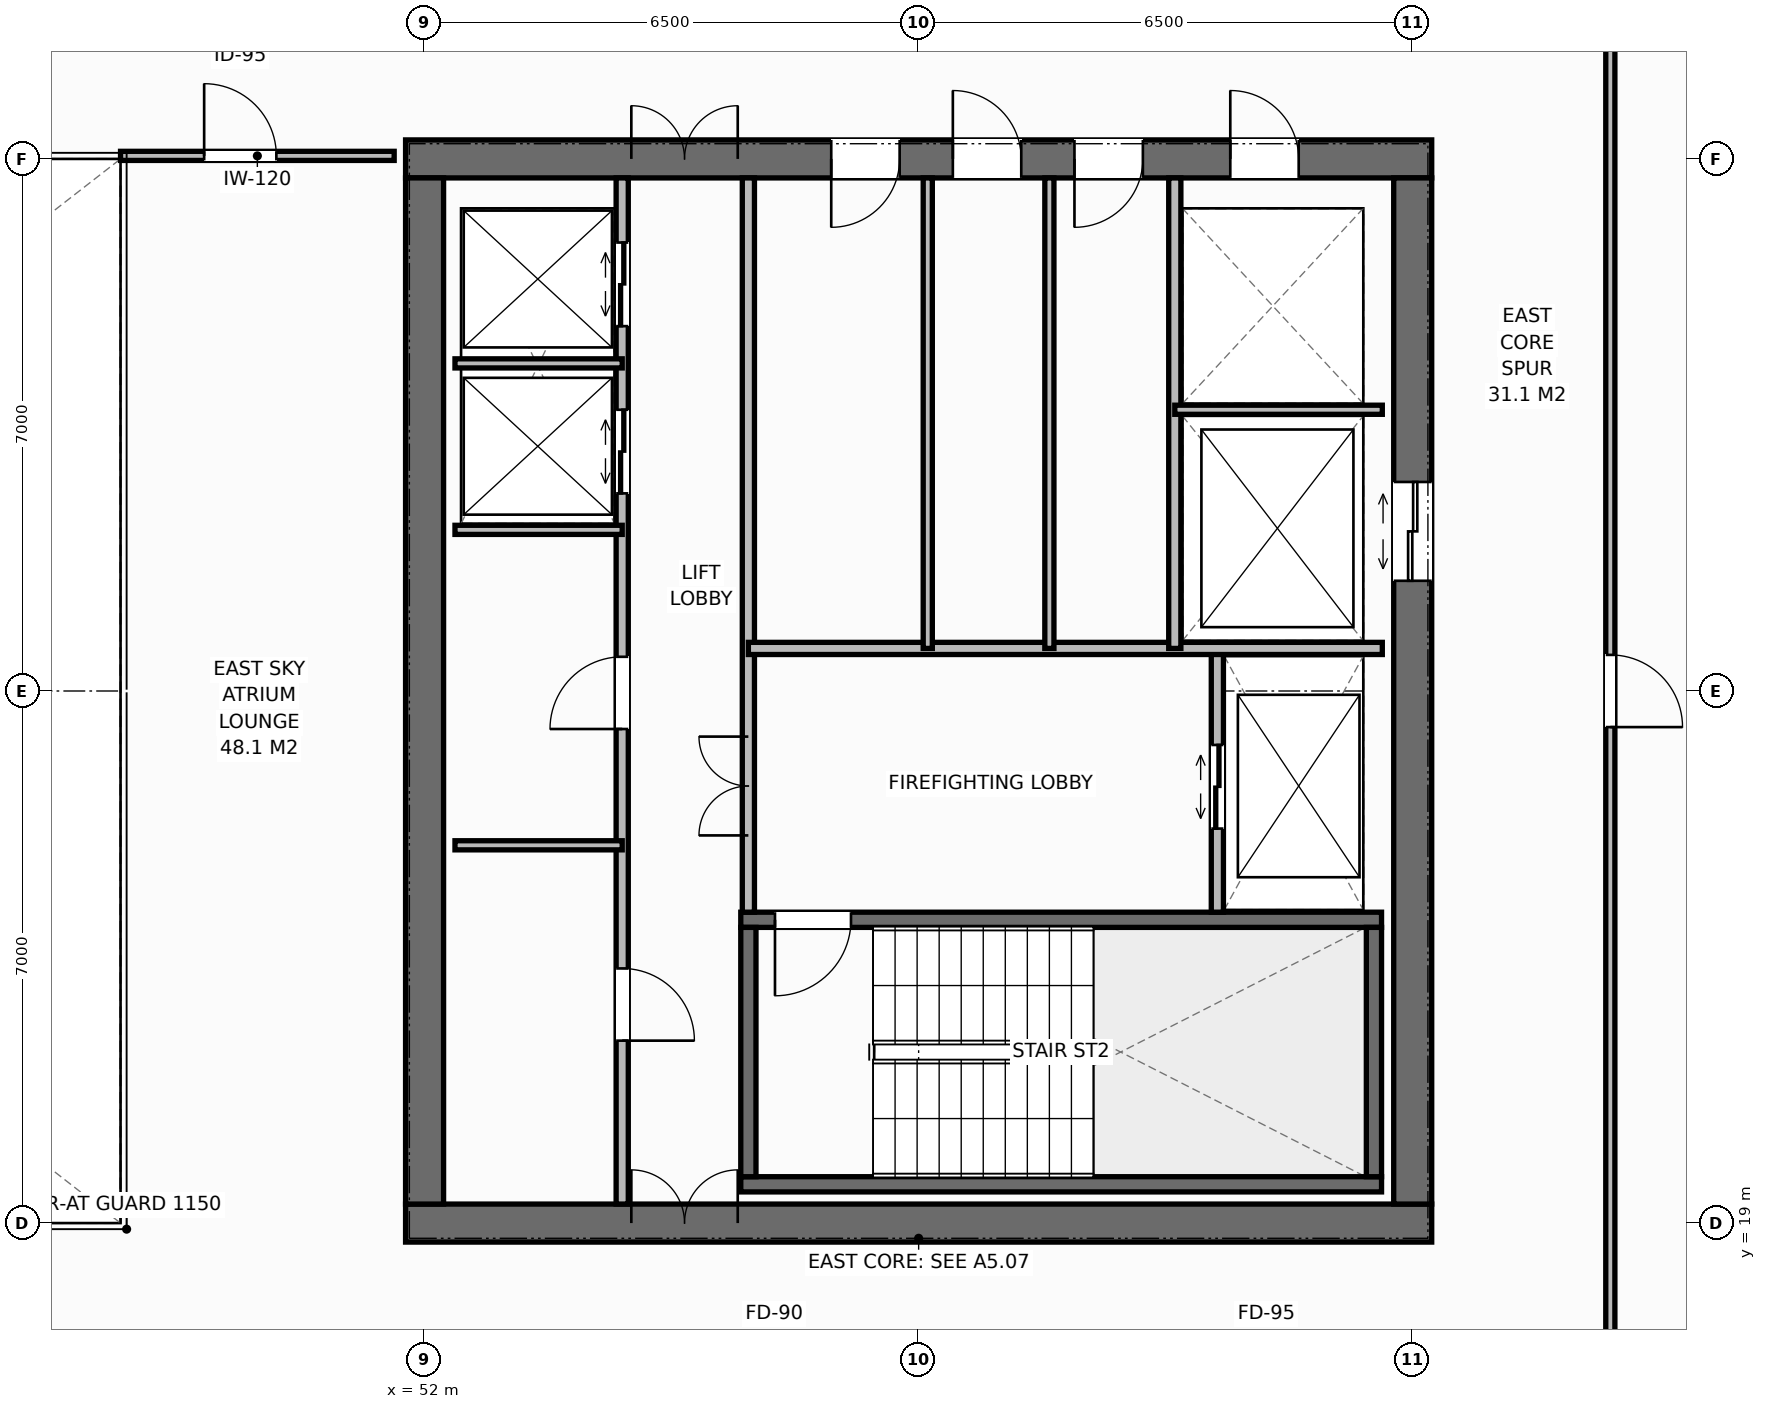
"""IFC4 building model, lengths in metres.
Left out: names, types, materials, properties, quantities, classifications, styles, units other than length and angle.
Written with IfcOpenShell. Run it as: python <this file> out.ifc"""

import sys

from ifc_helpers import new_model, si_unit, direction, frame, frame_2d, origin, place, context, subcontext, project, spatial, rectangle, extrude, element, fill, save


model = new_model("IFC4")
c1 = context("Model", 3, precision=1e-05, world=origin(), true_north=direction((0.0, 1.0)))
c2 = subcontext(c1, "Body", "Model", "MODEL_VIEW")
j1 = project(units=[si_unit("LENGTHUNIT", "METRE"), si_unit("PLANEANGLEUNIT", "RADIAN")], contexts=[c1])
p1 = place(None, origin())
s1 = spatial("IfcSite", under=j1, at=p1, CompositionType="ELEMENT")
p2 = place(p1, origin())
s2 = spatial("IfcBuilding", under=s1, at=p2, CompositionType="ELEMENT")
p3 = place(p2, frame((0.0, 0.0, 213.8)))
s3 = spatial("IfcBuildingStorey", under=s2, at=p3, CompositionType="ELEMENT", Elevation=213.8)
p4 = place(p3, frame((51.75, 19.0, 0.0), z_axis=(0.0, 0.0, 1.0), x_axis=(1.0, 0.0, 0.0)))
e1 = element("IfcWall", 1, at=p4, inside=s3, PredefinedType="SHEAR", context=c2, shape_type="SweptSolid", body=[
    extrude(rectangle(XDim=13.5, YDim=0.5, at=frame_2d((6.75, 0.0))), origin(), (0.0, 0.0, 1.0), 3.8),
])
p5 = place(p4, frame((2.97, 0.0, 0.0)))
e2 = element("IfcOpeningElement", 2, at=p5, cuts=e1, PredefinedType="OPENING", context=c2, shape_type="SweptSolid", body=[
    extrude(rectangle(XDim=1.4, YDim=2.2, at=frame_2d((0.7, 1.1))), frame((0.0, 0.26, 0.0), z_axis=(0.0, -1.0, 0.0), x_axis=(1.0, 0.0, 0.0)), (0.0, 0.0, 1.0), 0.52),
])
p6 = place(p3, frame((51.75, 33.0, 0.0), z_axis=(0.0, 0.0, 1.0), x_axis=(1.0, 0.0, 0.0)))
e3 = element("IfcWall", 3, at=p6, inside=s3, PredefinedType="SHEAR", context=c2, shape_type="SweptSolid", body=[
    extrude(rectangle(XDim=13.5, YDim=0.5, at=frame_2d((6.75, 0.0))), origin(), (0.0, 0.0, 1.0), 3.8),
])
p7 = place(p6, frame((2.97, 0.0, 0.0)))
e4 = element("IfcOpeningElement", 4, at=p7, cuts=e3, PredefinedType="OPENING", context=c2, shape_type="SweptSolid", body=[
    extrude(rectangle(XDim=1.4, YDim=2.2, at=frame_2d((0.7, 1.1))), frame((0.0, 0.26, 0.0), z_axis=(0.0, -1.0, 0.0), x_axis=(1.0, 0.0, 0.0)), (0.0, 0.0, 1.0), 0.52),
])
p8 = place(p6, frame((10.85, 0.0, 0.0)))
e5 = element("IfcOpeningElement", 5, at=p8, cuts=e3, PredefinedType="OPENING", context=c2, shape_type="SweptSolid", body=[
    extrude(rectangle(XDim=0.9, YDim=2.15, at=frame_2d((0.45, 1.075))), frame((0.0, 0.26, 0.0), z_axis=(0.0, -1.0, 0.0), x_axis=(1.0, 0.0, 0.0)), (0.0, 0.0, 1.0), 0.52),
])
p9 = place(p6, frame((5.6, 0.0, 0.0)))
e6 = element("IfcOpeningElement", 6, at=p9, cuts=e3, PredefinedType="OPENING", context=c2, shape_type="SweptSolid", body=[
    extrude(rectangle(XDim=0.9, YDim=2.15, at=frame_2d((0.45, 1.075))), frame((0.0, 0.26, 0.0), z_axis=(0.0, -1.0, 0.0), x_axis=(1.0, 0.0, 0.0)), (0.0, 0.0, 1.0), 0.52),
])
p10 = place(p6, frame((7.2, 0.0, 0.0)))
e7 = element("IfcOpeningElement", 7, at=p10, cuts=e3, PredefinedType="OPENING", context=c2, shape_type="SweptSolid", body=[
    extrude(rectangle(XDim=0.9, YDim=2.15, at=frame_2d((0.45, 1.075))), frame((0.0, 0.26, 0.0), z_axis=(0.0, -1.0, 0.0), x_axis=(1.0, 0.0, 0.0)), (0.0, 0.0, 1.0), 0.52),
])
p11 = place(p6, frame((8.8, 0.0, 0.0)))
e8 = element("IfcOpeningElement", 8, at=p11, cuts=e3, PredefinedType="OPENING", context=c2, shape_type="SweptSolid", body=[
    extrude(rectangle(XDim=0.9, YDim=2.15, at=frame_2d((0.45, 1.075))), frame((0.0, 0.26, 0.0), z_axis=(0.0, -1.0, 0.0), x_axis=(1.0, 0.0, 0.0)), (0.0, 0.0, 1.0), 0.52),
])
p12 = place(p3, frame((52.0, 19.25, 0.0), z_axis=(0.0, 0.0, 1.0), x_axis=(0.0, 1.0, 0.0)))
e9 = element("IfcWall", 9, at=p12, inside=s3, PredefinedType="SHEAR", context=c2, shape_type="SweptSolid", body=[
    extrude(rectangle(XDim=13.5, YDim=0.5, at=frame_2d((6.75, 0.0))), origin(), (0.0, 0.0, 1.0), 3.8),
])
p13 = place(p3, frame((65.0, 19.25, 0.0), z_axis=(0.0, 0.0, 1.0), x_axis=(0.0, 1.0, 0.0)))
e10 = element("IfcWall", 10, at=p13, inside=s3, PredefinedType="SHEAR", context=c2, shape_type="SweptSolid", body=[
    extrude(rectangle(XDim=13.5, YDim=0.5, at=frame_2d((6.75, 0.0))), origin(), (0.0, 0.0, 1.0), 3.8),
])
p14 = place(p13, frame((8.2, 0.0, 0.0)))
e11 = element("IfcOpeningElement", 11, at=p14, cuts=e10, PredefinedType="OPENING", context=c2, shape_type="SweptSolid", body=[
    extrude(rectangle(XDim=1.3, YDim=2.2, at=frame_2d((0.65, 1.1))), frame((0.0, 0.26, 0.0), z_axis=(0.0, -1.0, 0.0), x_axis=(1.0, 0.0, 0.0)), (0.0, 0.0, 1.0), 0.52),
])
p15 = place(p3, frame((56.16, 19.51, 0.0), z_axis=(0.0, 0.0, 1.0), x_axis=(1.0, 0.0, 0.0)))
e12 = element("IfcWall", 12, at=p15, inside=s3, PredefinedType="SHEAR", context=c2, shape_type="SweptSolid", body=[
    extrude(rectangle(XDim=8.43, YDim=0.2, at=frame_2d((4.215, 0.0))), origin(), (0.0, 0.0, 1.0), 3.8),
])
p16 = place(p3, frame((56.16, 22.99, 0.0), z_axis=(0.0, 0.0, 1.0), x_axis=(1.0, 0.0, 0.0)))
e13 = element("IfcWall", 13, at=p16, inside=s3, PredefinedType="SHEAR", context=c2, shape_type="SweptSolid", body=[
    extrude(rectangle(XDim=8.43, YDim=0.2, at=frame_2d((4.215, 0.0))), origin(), (0.0, 0.0, 1.0), 3.8),
])
p17 = place(p16, frame((0.45, 0.0, 0.0)))
e14 = element("IfcOpeningElement", 14, at=p17, cuts=e13, PredefinedType="OPENING", context=c2, shape_type="SweptSolid", body=[
    extrude(rectangle(XDim=1.0, YDim=2.15, at=frame_2d((0.5, 1.075))), frame((0.0, 0.11, 0.0), z_axis=(0.0, -1.0, 0.0), x_axis=(1.0, 0.0, 0.0)), (0.0, 0.0, 1.0), 0.22),
])
for number, where, z_axis, x_axis in (
    (15, (56.26, 19.61, 0.0), (0.0, 0.0, 1.0), (0.0, 1.0, 0.0)),
    (16, (64.49, 19.61, 0.0), (0.0, 0.0, 1.0), (0.0, 1.0, 0.0)),
):
    element("IfcWall", number, at=place(p3, frame(where, z_axis=z_axis, x_axis=x_axis)), inside=s3, PredefinedType="SHEAR", context=c2, shape_type="SweptSolid", body=[
        extrude(rectangle(XDim=3.28, YDim=0.2, at=frame_2d((1.64, 0.0))), origin(), (0.0, 0.0, 1.0), 3.8),
    ])
p18 = place(p3, frame((54.6, 19.25, 0.0), z_axis=(0.0, 0.0, 1.0), x_axis=(0.0, 1.0, 0.0)))
e17 = element("IfcWall", 17, at=p18, inside=s3, PredefinedType="STANDARD", context=c2, shape_type="SweptSolid", body=[
    extrude(rectangle(XDim=13.5, YDim=0.16, at=frame_2d((6.75, 0.0))), origin(), (0.0, 0.0, 1.0), 3.58),
])
p19 = place(p18, frame((2.15, 0.0, 0.0)))
e18 = element("IfcOpeningElement", 18, at=p19, cuts=e17, PredefinedType="OPENING", context=c2, shape_type="SweptSolid", body=[
    extrude(rectangle(XDim=0.95, YDim=2.15, at=frame_2d((0.475, 1.075))), frame((0.0, 0.09, 0.0), z_axis=(0.0, -1.0, 0.0), x_axis=(1.0, 0.0, 0.0)), (0.0, 0.0, 1.0), 0.18),
])
p20 = place(p18, frame((6.25, 0.0, 0.0)))
e19 = element("IfcOpeningElement", 19, at=p20, cuts=e17, PredefinedType="OPENING", context=c2, shape_type="SweptSolid", body=[
    extrude(rectangle(XDim=0.95, YDim=2.15, at=frame_2d((0.475, 1.075))), frame((0.0, 0.09, 0.0), z_axis=(0.0, -1.0, 0.0), x_axis=(1.0, 0.0, 0.0)), (0.0, 0.0, 1.0), 0.18),
])
p21 = place(p18, frame((9.35, 0.0, 0.0)))
e20 = element("IfcOpeningElement", 20, at=p21, cuts=e17, PredefinedType="OPENING", context=c2, shape_type="SweptSolid", body=[
    extrude(rectangle(XDim=1.1, YDim=2.2, at=frame_2d((0.55, 1.1))), frame((0.0, 0.09, 0.0), z_axis=(0.0, -1.0, 0.0), x_axis=(1.0, 0.0, 0.0)), (0.0, 0.0, 1.0), 0.18),
])
p22 = place(p18, frame((11.55, 0.0, 0.0)))
e21 = element("IfcOpeningElement", 21, at=p22, cuts=e17, PredefinedType="OPENING", context=c2, shape_type="SweptSolid", body=[
    extrude(rectangle(XDim=1.1, YDim=2.2, at=frame_2d((0.55, 1.1))), frame((0.0, 0.09, 0.0), z_axis=(0.0, -1.0, 0.0), x_axis=(1.0, 0.0, 0.0)), (0.0, 0.0, 1.0), 0.18),
])
p23 = place(p3, frame((56.26, 23.09, 0.0), z_axis=(0.0, 0.0, 1.0), x_axis=(0.0, 1.0, 0.0)))
e22 = element("IfcWall", 22, at=p23, inside=s3, PredefinedType="STANDARD", context=c2, shape_type="SweptSolid", body=[
    extrude(rectangle(XDim=9.66, YDim=0.16, at=frame_2d((4.83, 0.0))), origin(), (0.0, 0.0, 1.0), 3.58),
])
p24 = place(p23, frame((1.01, 0.0, 0.0)))
e23 = element("IfcOpeningElement", 23, at=p24, cuts=e22, PredefinedType="OPENING", context=c2, shape_type="SweptSolid", body=[
    extrude(rectangle(XDim=1.3, YDim=2.2, at=frame_2d((0.65, 1.1))), frame((0.0, 0.09, 0.0), z_axis=(0.0, -1.0, 0.0), x_axis=(1.0, 0.0, 0.0)), (0.0, 0.0, 1.0), 0.18),
])
for number, where, z_axis, x_axis in (
    (24, (52.4, 23.97, 0.0), (0.0, 0.0, 1.0), (1.0, 0.0, 0.0)),
    (25, (52.4, 28.12, 0.0), (0.0, 0.0, 1.0), (1.0, 0.0, 0.0)),
    (26, (52.4, 30.31, 0.0), (0.0, 0.0, 1.0), (1.0, 0.0, 0.0)),
):
    element("IfcWall", number, at=place(p3, frame(where, z_axis=z_axis, x_axis=x_axis)), inside=s3, PredefinedType="PARTITIONING", context=c2, shape_type="SweptSolid", body=[
        extrude(rectangle(XDim=2.2, YDim=0.12, at=frame_2d((1.1, 0.0))), origin(), (0.0, 0.0, 1.0), 3.58),
    ])
p25 = place(p3, frame((62.43, 23.09, 0.0), z_axis=(0.0, 0.0, 1.0), x_axis=(0.0, 1.0, 0.0)))
e27 = element("IfcWall", 27, at=p25, inside=s3, PredefinedType="STANDARD", context=c2, shape_type="SweptSolid", body=[
    extrude(rectangle(XDim=3.47, YDim=0.16, at=frame_2d((1.735, 0.0))), origin(), (0.0, 0.0, 1.0), 3.58),
])
p26 = place(p25, frame((1.1, 0.0, 0.0)))
e28 = element("IfcOpeningElement", 28, at=p26, cuts=e27, PredefinedType="OPENING", context=c2, shape_type="SweptSolid", body=[
    extrude(rectangle(XDim=1.1, YDim=2.2, at=frame_2d((0.55, 1.1))), frame((0.0, 0.09, 0.0), z_axis=(0.0, -1.0, 0.0), x_axis=(1.0, 0.0, 0.0)), (0.0, 0.0, 1.0), 0.18),
])
p27 = place(p3, frame((56.26, 26.56, 0.0), z_axis=(0.0, 0.0, 1.0), x_axis=(1.0, 0.0, 0.0)))
e29 = element("IfcWall", 29, at=p27, inside=s3, PredefinedType="STANDARD", context=c2, shape_type="SweptSolid", body=[
    extrude(rectangle(XDim=8.34, YDim=0.16, at=frame_2d((4.17, 0.0))), origin(), (0.0, 0.0, 1.0), 3.58),
])
p28 = place(p3, frame((61.87, 26.56, 0.0), z_axis=(0.0, 0.0, 1.0), x_axis=(0.0, 1.0, 0.0)))
e30 = element("IfcWall", 30, at=p28, inside=s3, PredefinedType="STANDARD", context=c2, shape_type="SweptSolid", body=[
    extrude(rectangle(XDim=6.19, YDim=0.16, at=frame_2d((3.095, 0.0))), origin(), (0.0, 0.0, 1.0), 3.58),
])
p29 = place(p3, frame((61.87, 29.7, 0.0), z_axis=(0.0, 0.0, 1.0), x_axis=(1.0, 0.0, 0.0)))
e31 = element("IfcWall", 31, at=p29, inside=s3, PredefinedType="PARTITIONING", context=c2, shape_type="SweptSolid", body=[
    extrude(rectangle(XDim=2.73, YDim=0.12, at=frame_2d((1.365, 0.0))), origin(), (0.0, 0.0, 1.0), 3.58),
])
for number, where, z_axis, x_axis in (
    (32, (58.62, 26.56, 0.0), (0.0, 0.0, 1.0), (0.0, 1.0, 0.0)),
    (33, (60.22, 26.56, 0.0), (0.0, 0.0, 1.0), (0.0, 1.0, 0.0)),
):
    element("IfcWall", number, at=place(p3, frame(where, z_axis=z_axis, x_axis=x_axis)), inside=s3, PredefinedType="PARTITIONING", context=c2, shape_type="SweptSolid", body=[
        extrude(rectangle(XDim=6.19, YDim=0.12, at=frame_2d((3.095, 0.0))), origin(), (0.0, 0.0, 1.0), 3.58),
    ])
p30 = place(p3, frame((48.0, 33.04, 0.0), z_axis=(0.0, 0.0, 1.0), x_axis=(1.0, 0.0, 0.0)))
e34 = element("IfcWall", 34, at=p30, inside=s3, PredefinedType="PARTITIONING", context=c2, shape_type="SweptSolid", body=[
    extrude(rectangle(XDim=3.6, YDim=0.12, at=frame_2d((1.8, 0.0))), origin(), (0.0, 0.0, 1.0), 3.32),
])
p31 = place(p30, frame((1.1, 0.0, 0.0)))
e35 = element("IfcOpeningElement", 35, at=p31, cuts=e34, PredefinedType="OPENING", context=c2, shape_type="SweptSolid", body=[
    extrude(rectangle(XDim=0.95, YDim=2.15, at=frame_2d((0.475, 1.075))), frame((0.0, 0.07, 0.0), z_axis=(0.0, -1.0, 0.0), x_axis=(1.0, 0.0, 0.0)), (0.0, 0.0, 1.0), 0.14),
])
p32 = place(p3, frame((67.6, 16.5, 0.0), z_axis=(0.0, 0.0, 1.0), x_axis=(0.0, 1.0, 0.0)))
e36 = element("IfcWall", 36, at=p32, inside=s3, PredefinedType="PARTITIONING", context=c2, shape_type="SweptSolid", body=[
    extrude(rectangle(XDim=19.0, YDim=0.12, at=frame_2d((9.5, 0.0))), origin(), (0.0, 0.0, 1.0), 3.58),
])
p33 = place(p32, frame((9.025, 0.0, 0.0)))
e37 = element("IfcOpeningElement", 37, at=p33, cuts=e36, PredefinedType="OPENING", context=c2, shape_type="SweptSolid", body=[
    extrude(rectangle(XDim=0.95, YDim=2.15, at=frame_2d((0.475, 1.075))), frame((0.0, 0.07, 0.0), z_axis=(0.0, -1.0, 0.0), x_axis=(1.0, 0.0, 0.0)), (0.0, 0.0, 1.0), 0.14),
])
p34 = place(p5, origin())
e38 = element("IfcDoor", 38, at=p34, inside=s3, OperationType="DOUBLE_DOOR_SINGLE_SWING", PredefinedType="DOOR", context=c2, shape_type="SweptSolid", body=[
    extrude(rectangle(XDim=1.4, YDim=2.2, at=frame_2d((0.7, 1.1))), frame((0.0, 0.075, 0.0), z_axis=(0.0, -1.0, 0.0), x_axis=(1.0, 0.0, 0.0)), (0.0, 0.0, 1.0), 0.05),
])
fill(e2, e38)
p35 = place(p7, origin())
e39 = element("IfcDoor", 39, at=p35, inside=s3, OperationType="DOUBLE_DOOR_SINGLE_SWING", PredefinedType="DOOR", context=c2, shape_type="SweptSolid", body=[
    extrude(rectangle(XDim=1.4, YDim=2.2, at=frame_2d((0.7, 1.1))), frame((0.0, -0.025, 0.0), z_axis=(0.0, -1.0, 0.0), x_axis=(1.0, 0.0, 0.0)), (0.0, 0.0, 1.0), 0.05),
])
fill(e4, e39)
p36 = place(p19, origin())
e40 = element("IfcDoor", 40, at=p36, inside=s3, OperationType="SINGLE_SWING_RIGHT", PredefinedType="DOOR", context=c2, shape_type="SweptSolid", body=[
    extrude(rectangle(XDim=0.95, YDim=2.15, at=frame_2d((0.475, 1.075))), frame((0.0, 0.025, 0.0), z_axis=(0.0, -1.0, 0.0), x_axis=(1.0, 0.0, 0.0)), (0.0, 0.0, 1.0), 0.05),
])
fill(e18, e40)
p37 = place(p20, origin())
e41 = element("IfcDoor", 41, at=p37, inside=s3, OperationType="SINGLE_SWING_LEFT", PredefinedType="DOOR", context=c2, shape_type="SweptSolid", body=[
    extrude(rectangle(XDim=0.95, YDim=2.15, at=frame_2d((0.475, 1.075))), frame((0.0, 0.025, 0.0), z_axis=(0.0, -1.0, 0.0), x_axis=(1.0, 0.0, 0.0)), (0.0, 0.0, 1.0), 0.05),
])
fill(e19, e41)
p38 = place(p21, origin())
e42 = element("IfcDoor", 42, at=p38, inside=s3, OperationType="DOUBLE_DOOR_SLIDING", PredefinedType="DOOR", context=c2, shape_type="SweptSolid", body=[
    extrude(rectangle(XDim=1.1, YDim=2.2, at=frame_2d((0.55, 1.1))), frame((0.0, 0.025, 0.0), z_axis=(0.0, -1.0, 0.0), x_axis=(1.0, 0.0, 0.0)), (0.0, 0.0, 1.0), 0.05),
])
fill(e20, e42)
p39 = place(p22, origin())
e43 = element("IfcDoor", 43, at=p39, inside=s3, OperationType="DOUBLE_DOOR_SLIDING", PredefinedType="DOOR", context=c2, shape_type="SweptSolid", body=[
    extrude(rectangle(XDim=1.1, YDim=2.2, at=frame_2d((0.55, 1.1))), frame((0.0, 0.025, 0.0), z_axis=(0.0, -1.0, 0.0), x_axis=(1.0, 0.0, 0.0)), (0.0, 0.0, 1.0), 0.05),
])
fill(e21, e43)
p40 = place(p17, origin())
e44 = element("IfcDoor", 44, at=p40, inside=s3, OperationType="SINGLE_SWING_RIGHT", PredefinedType="DOOR", context=c2, shape_type="SweptSolid", body=[
    extrude(rectangle(XDim=1.0, YDim=2.15, at=frame_2d((0.5, 1.075))), frame((0.0, 0.025, 0.0), z_axis=(0.0, -1.0, 0.0), x_axis=(1.0, 0.0, 0.0)), (0.0, 0.0, 1.0), 0.05),
])
fill(e14, e44)
p41 = place(p26, origin())
e45 = element("IfcDoor", 45, at=p41, inside=s3, OperationType="DOUBLE_DOOR_SLIDING", PredefinedType="DOOR", context=c2, shape_type="SweptSolid", body=[
    extrude(rectangle(XDim=1.1, YDim=2.2, at=frame_2d((0.55, 1.1))), frame((0.0, 0.025, 0.0), z_axis=(0.0, -1.0, 0.0), x_axis=(1.0, 0.0, 0.0)), (0.0, 0.0, 1.0), 0.05),
])
fill(e28, e45)
p42 = place(p24, origin())
e46 = element("IfcDoor", 46, at=p42, inside=s3, OperationType="DOUBLE_DOOR_SINGLE_SWING", PredefinedType="DOOR", context=c2, shape_type="SweptSolid", body=[
    extrude(rectangle(XDim=1.3, YDim=2.2, at=frame_2d((0.65, 1.1))), frame((0.0, 0.025, 0.0), z_axis=(0.0, -1.0, 0.0), x_axis=(1.0, 0.0, 0.0)), (0.0, 0.0, 1.0), 0.05),
])
fill(e23, e46)
p43 = place(p14, origin())
e47 = element("IfcDoor", 47, at=p43, inside=s3, OperationType="DOUBLE_DOOR_SLIDING", PredefinedType="DOOR", context=c2, shape_type="SweptSolid", body=[
    extrude(rectangle(XDim=1.3, YDim=2.2, at=frame_2d((0.65, 1.1))), frame((0.0, 0.025, 0.0), z_axis=(0.0, -1.0, 0.0), x_axis=(1.0, 0.0, 0.0)), (0.0, 0.0, 1.0), 0.05),
])
fill(e11, e47)
p44 = place(p8, origin())
e48 = element("IfcDoor", 48, at=p44, inside=s3, OperationType="SINGLE_SWING_LEFT", PredefinedType="DOOR", context=c2, shape_type="SweptSolid", body=[
    extrude(rectangle(XDim=0.9, YDim=2.15, at=frame_2d((0.45, 1.075))), frame((0.0, -0.025, 0.0), z_axis=(0.0, -1.0, 0.0), x_axis=(1.0, 0.0, 0.0)), (0.0, 0.0, 1.0), 0.05),
])
fill(e5, e48)
p45 = place(p9, origin())
e49 = element("IfcDoor", 49, at=p45, inside=s3, OperationType="SINGLE_SWING_RIGHT", PredefinedType="DOOR", context=c2, shape_type="SweptSolid", body=[
    extrude(rectangle(XDim=0.9, YDim=2.15, at=frame_2d((0.45, 1.075))), frame((0.0, -0.025, 0.0), z_axis=(0.0, -1.0, 0.0), x_axis=(1.0, 0.0, 0.0)), (0.0, 0.0, 1.0), 0.05),
])
fill(e6, e49)
p46 = place(p10, origin())
e50 = element("IfcDoor", 50, at=p46, inside=s3, OperationType="SINGLE_SWING_LEFT", PredefinedType="DOOR", context=c2, shape_type="SweptSolid", body=[
    extrude(rectangle(XDim=0.9, YDim=2.15, at=frame_2d((0.45, 1.075))), frame((0.0, -0.025, 0.0), z_axis=(0.0, -1.0, 0.0), x_axis=(1.0, 0.0, 0.0)), (0.0, 0.0, 1.0), 0.05),
])
fill(e7, e50)
p47 = place(p11, origin())
e51 = element("IfcDoor", 51, at=p47, inside=s3, OperationType="SINGLE_SWING_RIGHT", PredefinedType="DOOR", context=c2, shape_type="SweptSolid", body=[
    extrude(rectangle(XDim=0.9, YDim=2.15, at=frame_2d((0.45, 1.075))), frame((0.0, -0.025, 0.0), z_axis=(0.0, -1.0, 0.0), x_axis=(1.0, 0.0, 0.0)), (0.0, 0.0, 1.0), 0.05),
])
fill(e8, e51)
p48 = place(p31, origin())
e52 = element("IfcDoor", 52, at=p48, inside=s3, OperationType="SINGLE_SWING_LEFT", PredefinedType="DOOR", context=c2, shape_type="SweptSolid", body=[
    extrude(rectangle(XDim=0.95, YDim=2.15, at=frame_2d((0.475, 1.075))), frame((0.0, 0.025, 0.0), z_axis=(0.0, -1.0, 0.0), x_axis=(1.0, 0.0, 0.0)), (0.0, 0.0, 1.0), 0.05),
])
fill(e35, e52)
p49 = place(p33, origin())
e53 = element("IfcDoor", 53, at=p49, inside=s3, OperationType="SINGLE_SWING_RIGHT", PredefinedType="DOOR", context=c2, shape_type="SweptSolid", body=[
    extrude(rectangle(XDim=0.95, YDim=2.15, at=frame_2d((0.475, 1.075))), frame((0.0, 0.025, 0.0), z_axis=(0.0, -1.0, 0.0), x_axis=(1.0, 0.0, 0.0)), (0.0, 0.0, 1.0), 0.05),
])
fill(e37, e53)
save(model, sys.argv[1])
